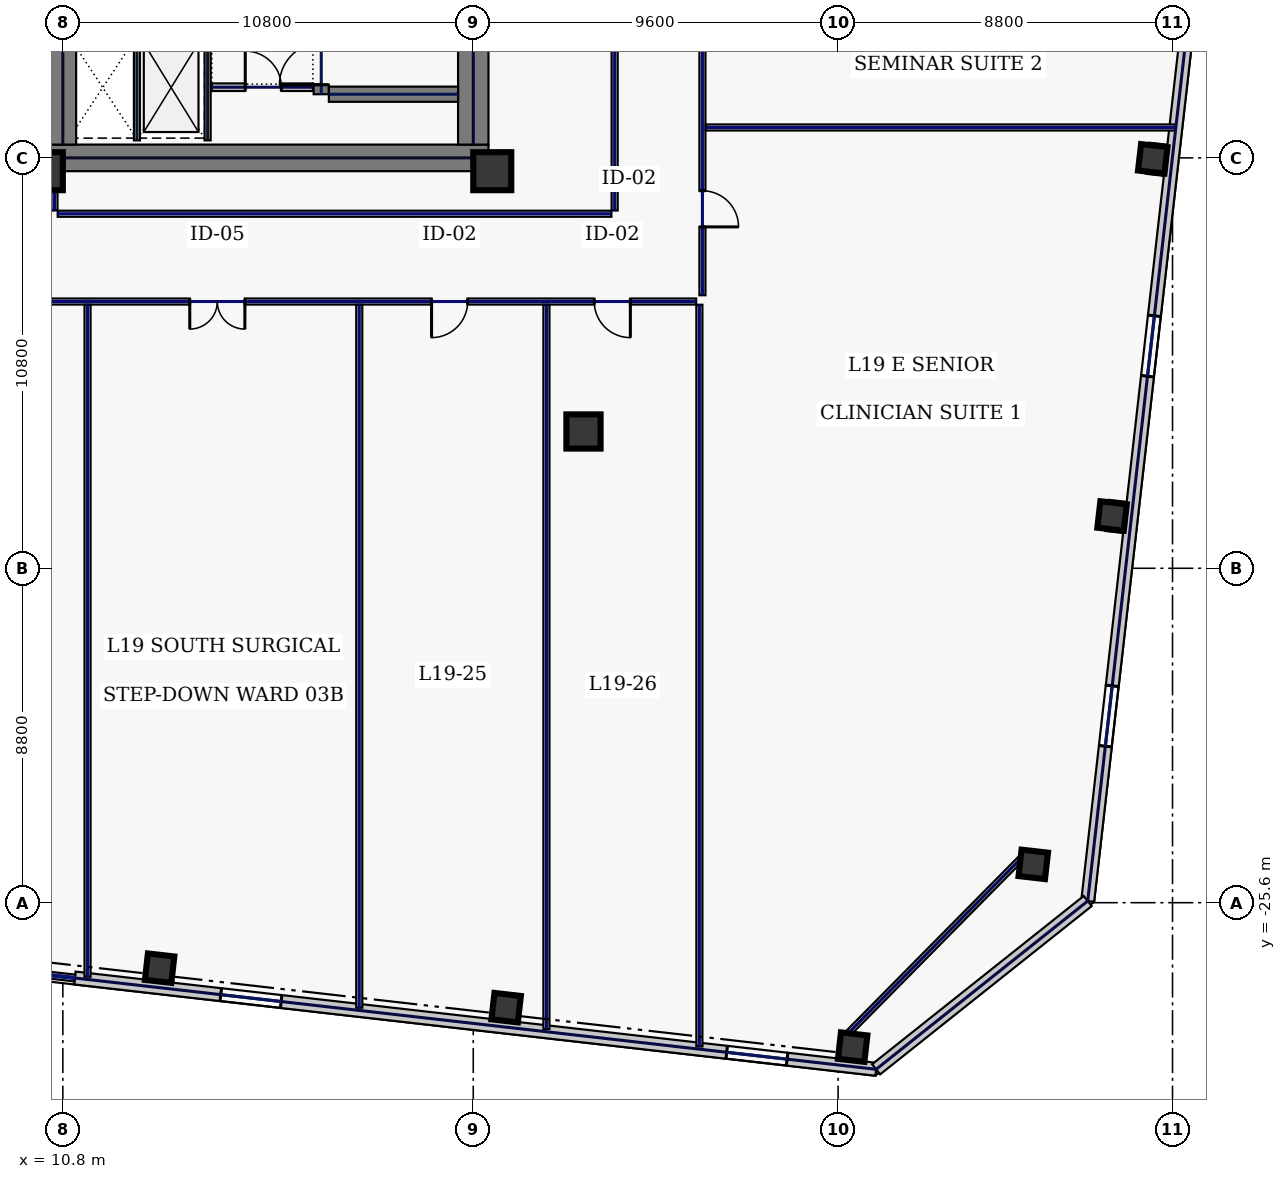
"""IFC4 building model, lengths in metres.
Left out: names, types, materials, properties, quantities, classifications, styles, units other than length and angle.
Written with IfcOpenShell. Run it as: python <this file> out.ifc"""

import sys

from ifc_helpers import new_model, si_unit, direction, frame, frame_2d, origin, origin_2d, place, context, subcontext, project, spatial, rectangle, hollow_rectangle, extrude, element, fill, save


model = new_model("IFC4")
c1 = context("Model", 3, precision=1e-05, world=origin(), true_north=direction((0.0, 1.0)))
c2 = subcontext(c1, "Body", "Model", "MODEL_VIEW")
j1 = project(units=[si_unit("LENGTHUNIT", "METRE"), si_unit("PLANEANGLEUNIT", "RADIAN")], contexts=[c1])
p1 = place(None, origin())
s1 = spatial("IfcSite", under=j1, at=p1, CompositionType="ELEMENT")
p2 = place(p1, origin())
s2 = spatial("IfcBuilding", under=s1, at=p2, CompositionType="ELEMENT")
p3 = place(p2, frame((0.0, 0.0, 89.4)))
s3 = spatial("IfcBuildingStorey", under=s2, at=p3, CompositionType="ELEMENT", Elevation=89.4)
p4 = place(p3, frame((10.45, -6.0, 0.0), z_axis=(0.0, 0.0, 1.0), x_axis=(1.0, 0.0, 0.0)))
e1 = element("IfcWall", 1, at=p4, inside=s3, PredefinedType="SHEAR", context=c2, shape_type="SweptSolid", body=[
    extrude(rectangle(XDim=11.55, YDim=0.7, at=frame_2d((5.775, 0.0))), origin(), (0.0, 0.0, 1.0), 3.74),
])
p5 = place(p3, frame((21.6, -5.65, 0.0), z_axis=(0.0, 0.0, 1.0), x_axis=(0.0, 1.0, 0.0)))
e2 = element("IfcWall", 2, at=p5, inside=s3, PredefinedType="SHEAR", context=c2, shape_type="SweptSolid", body=[
    extrude(rectangle(XDim=11.3, YDim=0.8, at=frame_2d((5.65, 0.0))), origin(), (0.0, 0.0, 1.0), 3.74),
])
p6 = place(p3, frame((10.8, -5.65, 0.0), z_axis=(0.0, 0.0, 1.0), x_axis=(0.0, 1.0, 0.0)))
e3 = element("IfcWall", 3, at=p6, inside=s3, PredefinedType="SHEAR", context=c2, shape_type="SweptSolid", body=[
    extrude(rectangle(XDim=3.0, YDim=0.7, at=frame_2d((1.5, 0.0))), origin(), (0.0, 0.0, 1.0), 3.74),
])
p7 = place(p3, frame((17.6, -4.325, 0.0), z_axis=(0.0, 0.0, 1.0), x_axis=(0.0, 1.0, 0.0)))
e4 = element("IfcWall", 4, at=p7, inside=s3, PredefinedType="SHEAR", context=c2, shape_type="SweptSolid", body=[
    extrude(rectangle(XDim=8.65, YDim=0.4, at=frame_2d((4.325, 0.0))), origin(), (0.0, 0.0, 1.0), 3.74),
])
p8 = place(p7, frame((0.25, 0.0, 0.0)))
e5 = element("IfcOpeningElement", 5, at=p8, cuts=e4, PredefinedType="OPENING", context=c2, shape_type="SweptSolid", body=[
    extrude(rectangle(XDim=1.1, YDim=2.2, at=frame_2d((0.55, 1.1))), frame((0.0, 0.21, 0.0), z_axis=(0.0, -1.0, 0.0), x_axis=(1.0, 0.0, 0.0)), (0.0, 0.0, 1.0), 0.42),
])
p9 = place(p3, frame((17.8, -4.325, 0.0), z_axis=(0.0, 0.0, 1.0), x_axis=(1.0, 0.0, 0.0)))
e6 = element("IfcWall", 6, at=p9, inside=s3, PredefinedType="SHEAR", context=c2, shape_type="SweptSolid", body=[
    extrude(rectangle(XDim=3.4, YDim=0.4, at=frame_2d((1.7, 0.0))), origin(), (0.0, 0.0, 1.0), 3.74),
])
for number, where, z_axis, x_axis in (
    (7, (10.3, -6.35, 0.0), (0.0, 0.0, 1.0), (1.0, 0.0, 0.0)),
    (8, (22.1, -6.35, 0.0), (0.0, 0.0, 1.0), (1.0, 0.0, 0.0)),
):
    element("IfcColumn", number, at=place(p3, frame(where, z_axis=z_axis, x_axis=x_axis)), inside=s3, PredefinedType="COLUMN", context=c2, shape_type="SweptSolid", body=[
        extrude(hollow_rectangle(XDim=1.0, YDim=1.0, WallThickness=0.045, at=origin_2d()), origin(), (0.0, 0.0, 1.0), 3.74),
    ])
p10 = place(p3, frame((24.5, -13.2, 0.0), z_axis=(0.0, 0.0, 1.0), x_axis=(1.0, 0.0, 0.0)))
e9 = element("IfcColumn", 9, at=p10, inside=s3, PredefinedType="COLUMN", context=c2, shape_type="SweptSolid", body=[
    extrude(hollow_rectangle(XDim=0.9, YDim=0.9, WallThickness=0.04, at=origin_2d()), origin(), (0.0, 0.0, 1.0), 3.74),
])
for number, where, z_axis, x_axis in (
    (10, (13.347, -27.323, 0.0), (0.0, 0.0, 1.0), (0.994, -0.113, 0.0)),
    (11, (22.465, -28.362, 0.0), (0.0, 0.0, 1.0), (0.994, -0.113, 0.0)),
    (12, (31.583, -29.401, 0.0), (0.0, 0.0, 1.0), (0.994, -0.113, 0.0)),
    (13, (36.336, -24.592, 0.0), (0.0, 0.0, 1.0), (0.994, -0.113, 0.0)),
    (14, (38.409, -15.424, 0.0), (0.0, 0.0, 1.0), (0.994, -0.113, 0.0)),
    (15, (39.48, -6.025, 0.0), (0.0, 0.0, 1.0), (0.994, -0.113, 0.0)),
):
    element("IfcColumn", number, at=place(p3, frame(where, z_axis=z_axis, x_axis=x_axis)), inside=s3, PredefinedType="COLUMN", context=c2, shape_type="SweptSolid", body=[
        extrude(hollow_rectangle(XDim=0.7, YDim=0.7, WallThickness=0.032, at=origin_2d()), origin(), (0.0, 0.0, 1.0), 3.74),
    ])
p11 = place(p3, frame((11.115, -27.582, 0.0), z_axis=(0.0, 0.0, 1.0), x_axis=(0.993572655904, -0.113196190044, 0.0)))
e16 = element("IfcWall", 16, at=p11, inside=s3, PredefinedType="STANDARD", context=c2, shape_type="SweptSolid", body=[
    extrude(rectangle(XDim=21.223, YDim=0.34, at=frame_2d((10.611, 0.0))), origin(), (0.0, 0.0, 1.0), 3.74),
])
p12 = place(p11, frame((3.866, 0.0, 0.22)))
e17 = element("IfcOpeningElement", 17, at=p12, cuts=e16, PredefinedType="OPENING", context=c2, shape_type="SweptSolid", body=[
    extrude(rectangle(XDim=1.6, YDim=1.2, at=frame_2d((0.8, 0.6))), frame((0.0, 0.18, 0.0), z_axis=(0.0, -1.0, 0.0), x_axis=(1.0, 0.0, 0.0)), (0.0, 0.0, 1.0), 0.36),
])
p13 = place(p11, frame((17.265, 0.0, 0.22)))
e18 = element("IfcOpeningElement", 18, at=p13, cuts=e16, PredefinedType="OPENING", context=c2, shape_type="SweptSolid", body=[
    extrude(rectangle(XDim=1.6, YDim=1.2, at=frame_2d((0.8, 0.6))), frame((0.0, 0.18, 0.0), z_axis=(0.0, -1.0, 0.0), x_axis=(1.0, 0.0, 0.0)), (0.0, 0.0, 1.0), 0.36),
])
p14 = place(p3, frame((37.768, -25.556, 0.0), z_axis=(0.0, 0.0, 1.0), x_axis=(0.113201605824, 0.993572038877, 0.0)))
e19 = element("IfcWall", 19, at=p14, inside=s3, PredefinedType="STANDARD", context=c2, shape_type="SweptSolid", body=[
    extrude(rectangle(XDim=39.2, YDim=0.34, at=frame_2d((19.6, 0.0))), origin(), (0.0, 0.0, 1.0), 3.74),
])
p15 = place(p14, frame((4.1, 0.0, 0.22)))
e20 = element("IfcOpeningElement", 20, at=p15, cuts=e19, PredefinedType="OPENING", context=c2, shape_type="SweptSolid", body=[
    extrude(rectangle(XDim=1.6, YDim=1.2, at=frame_2d((0.8, 0.6))), frame((0.0, 0.18, 0.0), z_axis=(0.0, -1.0, 0.0), x_axis=(1.0, 0.0, 0.0)), (0.0, 0.0, 1.0), 0.36),
])
p16 = place(p14, frame((13.9, 0.0, 0.22)))
e21 = element("IfcOpeningElement", 21, at=p16, cuts=e19, PredefinedType="OPENING", context=c2, shape_type="SweptSolid", body=[
    extrude(rectangle(XDim=1.6, YDim=1.2, at=frame_2d((0.8, 0.6))), frame((0.0, 0.18, 0.0), z_axis=(0.0, -1.0, 0.0), x_axis=(1.0, 0.0, 0.0)), (0.0, 0.0, 1.0), 0.36),
])
p17 = place(p14, frame((33.5, 0.0, 0.22)))
e22 = element("IfcOpeningElement", 22, at=p17, cuts=e19, PredefinedType="OPENING", context=c2, shape_type="SweptSolid", body=[
    extrude(rectangle(XDim=1.6, YDim=1.2, at=frame_2d((0.8, 0.6))), frame((0.0, 0.18, 0.0), z_axis=(0.0, -1.0, 0.0), x_axis=(1.0, 0.0, 0.0)), (0.0, 0.0, 1.0), 0.36),
])
p18 = place(p3, frame((32.201, -29.985, 0.0), z_axis=(0.0, 0.0, 1.0), x_axis=(0.78261359446, 0.622507800567, 0.0)))
e23 = element("IfcWall", 23, at=p18, inside=s3, PredefinedType="STANDARD", context=c2, shape_type="SweptSolid", body=[
    extrude(rectangle(XDim=7.114, YDim=0.34, at=frame_2d((3.557, 0.0))), origin(), (0.0, 0.0, 1.0), 3.74),
])
for number, where, z_axis, x_axis in (
    (24, (12.75, -5.54, 0.0), (0.0, 0.0, 1.0), (0.0, 1.0, 0.0)),
    (25, (14.61, -5.54, 0.0), (0.0, 0.0, 1.0), (0.0, 1.0, 0.0)),
):
    element("IfcWall", number, at=place(p3, frame(where, z_axis=z_axis, x_axis=x_axis)), inside=s3, PredefinedType="PARTITIONING", context=c2, shape_type="SweptSolid", body=[
        extrude(rectangle(XDim=2.7, YDim=0.16, at=frame_2d((1.35, 0.0))), origin(), (0.0, 0.0, 1.0), 3.74),
    ])
p19 = place(p3, frame((14.72, -4.14, 0.0), z_axis=(0.0, 0.0, 1.0), x_axis=(1.0, 0.0, 0.0)))
e26 = element("IfcWall", 26, at=p19, inside=s3, PredefinedType="SOLIDWALL", context=c2, shape_type="SweptSolid", body=[
    extrude(rectangle(XDim=2.66, YDim=0.2, at=frame_2d((1.33, 0.0))), origin(), (0.0, 0.0, 1.0), 3.74),
])
p20 = place(p19, frame((0.88, 0.0, 0.0)))
e27 = element("IfcOpeningElement", 27, at=p20, cuts=e26, PredefinedType="OPENING", context=c2, shape_type="SweptSolid", body=[
    extrude(rectangle(XDim=0.95, YDim=2.2, at=frame_2d((0.475, 1.1))), frame((0.0, 0.11, 0.0), z_axis=(0.0, -1.0, 0.0), x_axis=(1.0, 0.0, 0.0)), (0.0, 0.0, 1.0), 0.22),
])
p21 = place(p3, frame((31.341, -29.162, 0.0), z_axis=(0.0, 0.0, 1.0), x_axis=(0.702905898933, 0.711282853192, 0.0)))
e28 = element("IfcWall", 28, at=p21, inside=s3, PredefinedType="PARTITIONING", context=c2, shape_type="SweptSolid", body=[
    extrude(rectangle(XDim=6.761, YDim=0.16, at=frame_2d((3.381, 0.0))), origin(), (0.0, 0.0, 1.0), 1.535),
])
p22 = place(p3, frame((27.63, 9.665, 0.0), z_axis=(0.0, 0.0, 1.0), x_axis=(0.0, -1.0, 0.0)))
e29 = element("IfcWall", 29, at=p22, inside=s3, PredefinedType="PARTITIONING", context=c2, shape_type="SweptSolid", body=[
    extrude(rectangle(XDim=19.28, YDim=0.16, at=frame_2d((9.64, 0.0))), origin(), (0.0, 0.0, 1.0), 3.74),
])
p23 = place(p22, frame((16.531, 0.0, 0.0)))
e30 = element("IfcOpeningElement", 30, at=p23, cuts=e29, PredefinedType="OPENING", context=c2, shape_type="SweptSolid", body=[
    extrude(rectangle(XDim=0.95, YDim=2.2, at=frame_2d((0.475, 1.1))), frame((0.0, 0.09, 0.0), z_axis=(0.0, -1.0, 0.0), x_axis=(1.0, 0.0, 0.0)), (0.0, 0.0, 1.0), 0.18),
])
p24 = place(p22, frame((11.875, 0.0, 0.0)))
e31 = element("IfcOpeningElement", 31, at=p24, cuts=e29, PredefinedType="OPENING", context=c2, shape_type="SweptSolid", body=[
    extrude(rectangle(XDim=0.95, YDim=2.2, at=frame_2d((0.475, 1.1))), frame((0.0, 0.09, 0.0), z_axis=(0.0, -1.0, 0.0), x_axis=(1.0, 0.0, 0.0)), (0.0, 0.0, 1.0), 0.18),
])
p25 = place(p22, frame((6.675, 0.0, 0.0)))
e32 = element("IfcOpeningElement", 32, at=p25, cuts=e29, PredefinedType="OPENING", context=c2, shape_type="SweptSolid", body=[
    extrude(rectangle(XDim=0.95, YDim=2.2, at=frame_2d((0.475, 1.1))), frame((0.0, 0.09, 0.0), z_axis=(0.0, -1.0, 0.0), x_axis=(1.0, 0.0, 0.0)), (0.0, 0.0, 1.0), 0.18),
])
p26 = place(p22, frame((1.994, 0.0, 0.0)))
e33 = element("IfcOpeningElement", 33, at=p26, cuts=e29, PredefinedType="OPENING", context=c2, shape_type="SweptSolid", body=[
    extrude(rectangle(XDim=0.95, YDim=2.2, at=frame_2d((0.475, 1.1))), frame((0.0, 0.09, 0.0), z_axis=(0.0, -1.0, 0.0), x_axis=(1.0, 0.0, 0.0)), (0.0, 0.0, 1.0), 0.18),
])
p27 = place(p3, frame((27.465, -9.78, 0.0), z_axis=(0.0, 0.0, 1.0), x_axis=(-1.0, 0.0, 0.0)))
e34 = element("IfcWall", 34, at=p27, inside=s3, PredefinedType="PARTITIONING", context=c2, shape_type="SweptSolid", body=[
    extrude(rectangle(XDim=54.93, YDim=0.16, at=frame_2d((27.465, 0.0))), origin(), (0.0, 0.0, 1.0), 3.74),
])
p28 = place(p27, frame((49.256, 0.0, 0.0)))
e35 = element("IfcOpeningElement", 35, at=p28, cuts=e34, PredefinedType="OPENING", context=c2, shape_type="SweptSolid", body=[
    extrude(rectangle(XDim=0.95, YDim=2.2, at=frame_2d((0.475, 1.1))), frame((0.0, 0.09, 0.0), z_axis=(0.0, -1.0, 0.0), x_axis=(1.0, 0.0, 0.0)), (0.0, 0.0, 1.0), 0.18),
])
p29 = place(p27, frame((39.5, 0.0, 0.0)))
e36 = element("IfcOpeningElement", 36, at=p29, cuts=e34, PredefinedType="OPENING", context=c2, shape_type="SweptSolid", body=[
    extrude(rectangle(XDim=0.95, YDim=2.2, at=frame_2d((0.475, 1.1))), frame((0.0, 0.09, 0.0), z_axis=(0.0, -1.0, 0.0), x_axis=(1.0, 0.0, 0.0)), (0.0, 0.0, 1.0), 0.18),
])
p30 = place(p27, frame((28.425, 0.0, 0.0)))
e37 = element("IfcOpeningElement", 37, at=p30, cuts=e34, PredefinedType="OPENING", context=c2, shape_type="SweptSolid", body=[
    extrude(rectangle(XDim=1.3, YDim=2.2, at=frame_2d((0.65, 1.1))), frame((0.0, 0.09, 0.0), z_axis=(0.0, -1.0, 0.0), x_axis=(1.0, 0.0, 0.0)), (0.0, 0.0, 1.0), 0.18),
])
p31 = place(p27, frame((19.475, 0.0, 0.0)))
e38 = element("IfcOpeningElement", 38, at=p31, cuts=e34, PredefinedType="OPENING", context=c2, shape_type="SweptSolid", body=[
    extrude(rectangle(XDim=1.3, YDim=2.2, at=frame_2d((0.65, 1.1))), frame((0.0, 0.09, 0.0), z_axis=(0.0, -1.0, 0.0), x_axis=(1.0, 0.0, 0.0)), (0.0, 0.0, 1.0), 0.18),
])
p32 = place(p27, frame((11.875, 0.0, 0.0)))
e39 = element("IfcOpeningElement", 39, at=p32, cuts=e34, PredefinedType="OPENING", context=c2, shape_type="SweptSolid", body=[
    extrude(rectangle(XDim=1.45, YDim=2.2, at=frame_2d((0.725, 1.1))), frame((0.0, 0.09, 0.0), z_axis=(0.0, -1.0, 0.0), x_axis=(1.0, 0.0, 0.0)), (0.0, 0.0, 1.0), 0.18),
])
p33 = place(p27, frame((6.012, 0.0, 0.0)))
e40 = element("IfcOpeningElement", 40, at=p33, cuts=e34, PredefinedType="OPENING", context=c2, shape_type="SweptSolid", body=[
    extrude(rectangle(XDim=0.95, YDim=2.2, at=frame_2d((0.475, 1.1))), frame((0.0, 0.09, 0.0), z_axis=(0.0, -1.0, 0.0), x_axis=(1.0, 0.0, 0.0)), (0.0, 0.0, 1.0), 0.18),
])
p34 = place(p27, frame((1.732, 0.0, 0.0)))
e41 = element("IfcOpeningElement", 41, at=p34, cuts=e34, PredefinedType="OPENING", context=c2, shape_type="SweptSolid", body=[
    extrude(rectangle(XDim=0.95, YDim=2.2, at=frame_2d((0.475, 1.1))), frame((0.0, 0.09, 0.0), z_axis=(0.0, -1.0, 0.0), x_axis=(1.0, 0.0, 0.0)), (0.0, 0.0, 1.0), 0.18),
])
p35 = place(p3, frame((10.58, -6.42, 0.0), z_axis=(0.0, 0.0, 1.0), x_axis=(0.0, -1.0, 0.0)))
e42 = element("IfcWall", 42, at=p35, inside=s3, PredefinedType="PARTITIONING", context=c2, shape_type="SweptSolid", body=[
    extrude(rectangle(XDim=0.965, YDim=0.16, at=frame_2d((0.482, 0.0))), origin(), (0.0, 0.0, 1.0), 3.74),
])
p36 = place(p3, frame((10.665, -7.47, 0.0), z_axis=(0.0, 0.0, 1.0), x_axis=(1.0, 0.0, 0.0)))
e43 = element("IfcWall", 43, at=p36, inside=s3, PredefinedType="PARTITIONING", context=c2, shape_type="SweptSolid", body=[
    extrude(rectangle(XDim=14.57, YDim=0.16, at=frame_2d((7.285, 0.0))), origin(), (0.0, 0.0, 1.0), 3.74),
])
p37 = place(p3, frame((25.32, -7.385, 0.0), z_axis=(0.0, 0.0, 1.0), x_axis=(0.0, 1.0, 0.0)))
e44 = element("IfcWall", 44, at=p37, inside=s3, PredefinedType="PARTITIONING", context=c2, shape_type="SweptSolid", body=[
    extrude(rectangle(XDim=14.82, YDim=0.16, at=frame_2d((7.41, 0.0))), origin(), (0.0, 0.0, 1.0), 3.74),
])
p38 = place(p3, frame((27.55, -29.385, 0.0), z_axis=(0.0, 0.0, 1.0), x_axis=(0.0, 1.0, 0.0)))
e45 = element("IfcWall", 45, at=p38, inside=s3, PredefinedType="PARTITIONING", context=c2, shape_type="SweptSolid", body=[
    extrude(rectangle(XDim=19.52, YDim=0.16, at=frame_2d((9.76, 0.0))), origin(), (0.0, 0.0, 1.0), 3.74),
])
p39 = place(p3, frame((18.6, -28.365, 0.0), z_axis=(0.0, 0.0, 1.0), x_axis=(0.0, 1.0, 0.0)))
e46 = element("IfcWall", 46, at=p39, inside=s3, PredefinedType="PARTITIONING", context=c2, shape_type="SweptSolid", body=[
    extrude(rectangle(XDim=18.5, YDim=0.16, at=frame_2d((9.25, 0.0))), origin(), (0.0, 0.0, 1.0), 3.74),
])
p40 = place(p3, frame((11.45, -27.55, 0.0), z_axis=(0.0, 0.0, 1.0), x_axis=(0.0, 1.0, 0.0)))
e47 = element("IfcWall", 47, at=p40, inside=s3, PredefinedType="PARTITIONING", context=c2, shape_type="SweptSolid", body=[
    extrude(rectangle(XDim=17.685, YDim=0.16, at=frame_2d((8.843, 0.0))), origin(), (0.0, 0.0, 1.0), 3.74),
])
p41 = place(p3, frame((23.525, -28.926, 0.0), z_axis=(0.0, 0.0, 1.0), x_axis=(0.0, 1.0, 0.0)))
e48 = element("IfcWall", 48, at=p41, inside=s3, PredefinedType="PARTITIONING", context=c2, shape_type="SweptSolid", body=[
    extrude(rectangle(XDim=19.061, YDim=0.16, at=frame_2d((9.53, 0.0))), origin(), (0.0, 0.0, 1.0), 2.135),
])
p42 = place(p3, frame((27.715, -5.2, 0.0), z_axis=(0.0, 0.0, 1.0), x_axis=(1.0, 0.0, 0.0)))
e49 = element("IfcWall", 49, at=p42, inside=s3, PredefinedType="PARTITIONING", context=c2, shape_type="SweptSolid", body=[
    extrude(rectangle(XDim=12.352, YDim=0.16, at=frame_2d((6.176, 0.0))), origin(), (0.0, 0.0, 1.0), 3.74),
])
p43 = place(p12, origin())
e50 = element("IfcWindow", 50, at=p43, inside=s3, PartitioningType="SINGLE_PANEL", PredefinedType="WINDOW", context=c2, shape_type="SweptSolid", body=[
    extrude(rectangle(XDim=1.6, YDim=1.2, at=frame_2d((0.8, 0.6))), frame((0.0, 0.03, 0.0), z_axis=(0.0, -1.0, 0.0), x_axis=(1.0, 0.0, 0.0)), (0.0, 0.0, 1.0), 0.06),
])
fill(e17, e50)
p44 = place(p13, origin())
e51 = element("IfcWindow", 51, at=p44, inside=s3, PartitioningType="SINGLE_PANEL", PredefinedType="WINDOW", context=c2, shape_type="SweptSolid", body=[
    extrude(rectangle(XDim=1.6, YDim=1.2, at=frame_2d((0.8, 0.6))), frame((0.0, 0.03, 0.0), z_axis=(0.0, -1.0, 0.0), x_axis=(1.0, 0.0, 0.0)), (0.0, 0.0, 1.0), 0.06),
])
fill(e18, e51)
p45 = place(p15, origin())
e52 = element("IfcWindow", 52, at=p45, inside=s3, PartitioningType="SINGLE_PANEL", PredefinedType="WINDOW", context=c2, shape_type="SweptSolid", body=[
    extrude(rectangle(XDim=1.6, YDim=1.2, at=frame_2d((0.8, 0.6))), frame((0.0, 0.03, 0.0), z_axis=(0.0, -1.0, 0.0), x_axis=(1.0, 0.0, 0.0)), (0.0, 0.0, 1.0), 0.06),
])
fill(e20, e52)
p46 = place(p16, origin())
e53 = element("IfcWindow", 53, at=p46, inside=s3, PartitioningType="SINGLE_PANEL", PredefinedType="WINDOW", context=c2, shape_type="SweptSolid", body=[
    extrude(rectangle(XDim=1.6, YDim=1.2, at=frame_2d((0.8, 0.6))), frame((0.0, 0.03, 0.0), z_axis=(0.0, -1.0, 0.0), x_axis=(1.0, 0.0, 0.0)), (0.0, 0.0, 1.0), 0.06),
])
fill(e21, e53)
p47 = place(p8, origin())
e54 = element("IfcDoor", 54, at=p47, inside=s3, OperationType="SINGLE_SWING_LEFT", PredefinedType="DOOR", context=c2, shape_type="SweptSolid", body=[
    extrude(rectangle(XDim=1.1, YDim=2.2, at=frame_2d((0.55, 1.1))), frame((0.0, 0.025, 0.0), z_axis=(0.0, -1.0, 0.0), x_axis=(1.0, 0.0, 0.0)), (0.0, 0.0, 1.0), 0.05),
])
fill(e5, e54)
p48 = place(p20, origin())
e55 = element("IfcDoor", 55, at=p48, inside=s3, OperationType="SINGLE_SWING_LEFT", PredefinedType="DOOR", context=c2, shape_type="SweptSolid", body=[
    extrude(rectangle(XDim=0.95, YDim=2.2, at=frame_2d((0.475, 1.1))), frame((0.0, 0.025, 0.0), z_axis=(0.0, -1.0, 0.0), x_axis=(1.0, 0.0, 0.0)), (0.0, 0.0, 1.0), 0.05),
])
fill(e27, e55)
p49 = place(p32, origin())
e56 = element("IfcDoor", 56, at=p49, inside=s3, OperationType="DOUBLE_SWING_LEFT", PredefinedType="DOOR", context=c2, shape_type="SweptSolid", body=[
    extrude(rectangle(XDim=1.45, YDim=2.2, at=frame_2d((0.725, 1.1))), frame((0.0, 0.025, 0.0), z_axis=(0.0, -1.0, 0.0), x_axis=(1.0, 0.0, 0.0)), (0.0, 0.0, 1.0), 0.05),
])
fill(e39, e56)
p50 = place(p33, origin())
e57 = element("IfcDoor", 57, at=p50, inside=s3, OperationType="SINGLE_SWING_RIGHT", PredefinedType="DOOR", context=c2, shape_type="SweptSolid", body=[
    extrude(rectangle(XDim=0.95, YDim=2.2, at=frame_2d((0.475, 1.1))), frame((0.0, 0.025, 0.0), z_axis=(0.0, -1.0, 0.0), x_axis=(1.0, 0.0, 0.0)), (0.0, 0.0, 1.0), 0.05),
])
fill(e40, e57)
p51 = place(p34, origin())
e58 = element("IfcDoor", 58, at=p51, inside=s3, OperationType="SINGLE_SWING_LEFT", PredefinedType="DOOR", context=c2, shape_type="SweptSolid", body=[
    extrude(rectangle(XDim=0.95, YDim=2.2, at=frame_2d((0.475, 1.1))), frame((0.0, 0.025, 0.0), z_axis=(0.0, -1.0, 0.0), x_axis=(1.0, 0.0, 0.0)), (0.0, 0.0, 1.0), 0.05),
])
fill(e41, e58)
p52 = place(p23, origin())
e59 = element("IfcDoor", 59, at=p52, inside=s3, OperationType="SINGLE_SWING_RIGHT", PredefinedType="DOOR", context=c2, shape_type="SweptSolid", body=[
    extrude(rectangle(XDim=0.95, YDim=2.2, at=frame_2d((0.475, 1.1))), frame((0.0, 0.025, 0.0), z_axis=(0.0, -1.0, 0.0), x_axis=(1.0, 0.0, 0.0)), (0.0, 0.0, 1.0), 0.05),
])
fill(e30, e59)
save(model, sys.argv[1])
